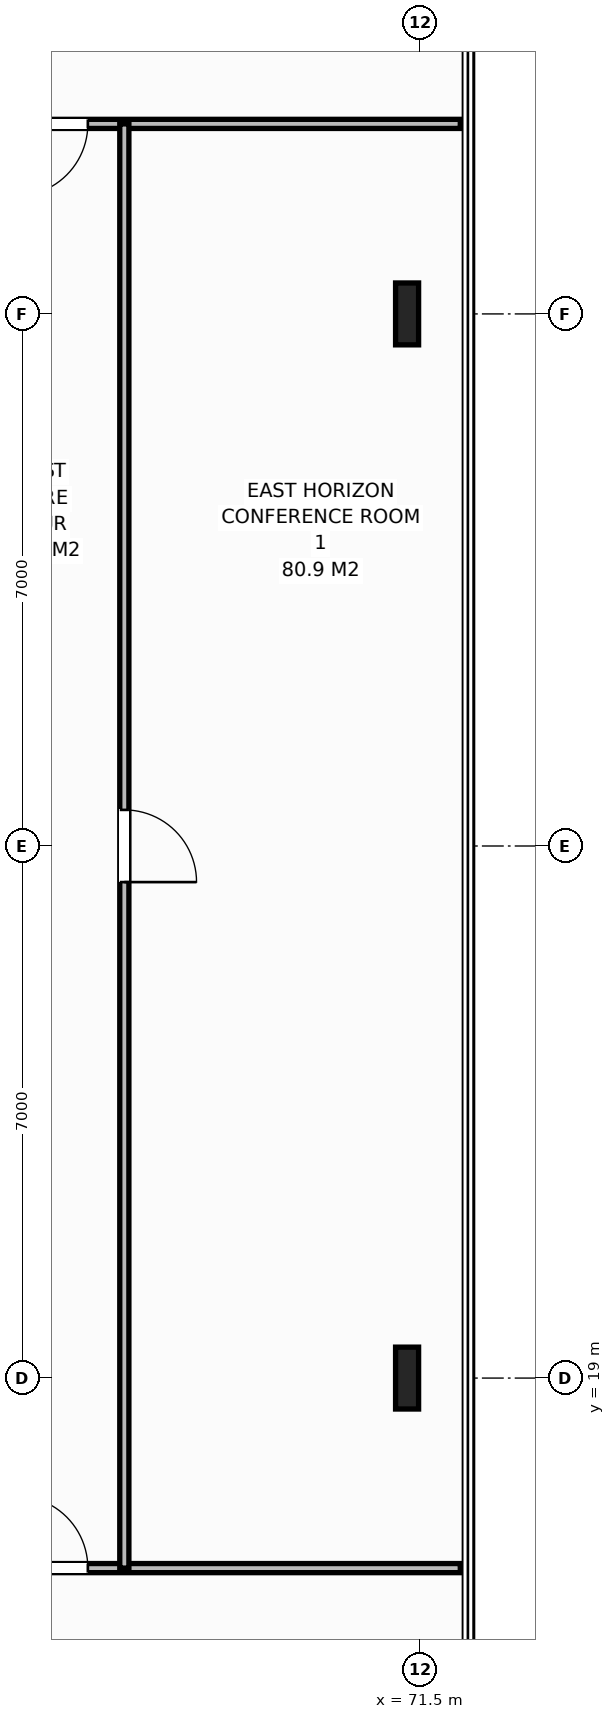
"""IFC4 building model, lengths in metres.
Left out: names, types, materials, properties, quantities, classifications, styles, units other than length and angle.
Written with IfcOpenShell. Run it as: python <this file> out.ifc"""

import sys

from ifc_helpers import new_model, si_unit, direction, frame, frame_2d, origin, origin_2d, place, context, subcontext, project, spatial, rectangle, i_section, extrude, element, fill, save


model = new_model("IFC4")
c1 = context("Model", 3, precision=1e-05, world=origin(), true_north=direction((0.0, 1.0)))
c2 = subcontext(c1, "Body", "Model", "MODEL_VIEW")
j1 = project(units=[si_unit("LENGTHUNIT", "METRE"), si_unit("PLANEANGLEUNIT", "RADIAN")], contexts=[c1])
p1 = place(None, origin())
s1 = spatial("IfcSite", under=j1, at=p1, CompositionType="ELEMENT")
p2 = place(p1, origin())
s2 = spatial("IfcBuilding", under=s1, at=p2, CompositionType="ELEMENT")
p3 = place(p2, frame((0.0, 0.0, 251.8)))
s3 = spatial("IfcBuildingStorey", under=s2, at=p3, CompositionType="ELEMENT", Elevation=251.8)
for number, where, z_axis, x_axis in (
    (1, (71.32, 19.0, 0.0), (0.0, 0.0, 1.0), (1.0, 0.0, 0.0)),
    (2, (71.32, 33.0, 0.0), (0.0, 0.0, 1.0), (1.0, 0.0, 0.0)),
):
    element("IfcColumn", number, at=place(p3, frame(where, z_axis=z_axis, x_axis=x_axis)), inside=s3, PredefinedType="COLUMN", context=c2, shape_type="SweptSolid", body=[
        extrude(i_section(OverallWidth=0.303, OverallDepth=0.814, WebThickness=0.021, FlangeThickness=0.04, at=origin_2d()), origin(), (0.0, 0.0, 1.0), 3.8),
    ])
p4 = place(p3, frame((64.86, 35.5, 0.0), z_axis=(0.0, 0.0, 1.0), x_axis=(1.0, 0.0, 0.0)))
e3 = element("IfcWall", 3, at=p4, inside=s3, PredefinedType="PARTITIONING", context=c2, shape_type="SweptSolid", body=[
    extrude(rectangle(XDim=7.16, YDim=0.12, at=frame_2d((3.58, 0.0))), origin(), (0.0, 0.0, 1.0), 3.588),
])
p5 = place(p4, frame((1.31, 0.0, 0.0)))
e4 = element("IfcOpeningElement", 4, at=p5, cuts=e3, PredefinedType="OPENING", context=c2, shape_type="SweptSolid", body=[
    extrude(rectangle(XDim=0.95, YDim=2.15, at=frame_2d((0.475, 1.075))), frame((0.0, 0.07, 0.0), z_axis=(0.0, -1.0, 0.0), x_axis=(1.0, 0.0, 0.0)), (0.0, 0.0, 1.0), 0.14),
])
p6 = place(p3, frame((64.063, 16.5, 0.0), z_axis=(0.0, 0.0, 1.0), x_axis=(1.0, 0.0, 0.0)))
e5 = element("IfcWall", 5, at=p6, inside=s3, PredefinedType="PARTITIONING", context=c2, shape_type="SweptSolid", body=[
    extrude(rectangle(XDim=7.957, YDim=0.12, at=frame_2d((3.979, 0.0))), origin(), (0.0, 0.0, 1.0), 3.588),
])
p7 = place(p6, frame((2.107, 0.0, 0.0)))
e6 = element("IfcOpeningElement", 6, at=p7, cuts=e5, PredefinedType="OPENING", context=c2, shape_type="SweptSolid", body=[
    extrude(rectangle(XDim=0.95, YDim=2.15, at=frame_2d((0.475, 1.075))), frame((0.0, 0.07, 0.0), z_axis=(0.0, -1.0, 0.0), x_axis=(1.0, 0.0, 0.0)), (0.0, 0.0, 1.0), 0.14),
])
p8 = place(p3, frame((67.6, 16.5, 0.0), z_axis=(0.0, 0.0, 1.0), x_axis=(0.0, 1.0, 0.0)))
e7 = element("IfcWall", 7, at=p8, inside=s3, PredefinedType="PARTITIONING", context=c2, shape_type="SweptSolid", body=[
    extrude(rectangle(XDim=19.0, YDim=0.12, at=frame_2d((9.5, 0.0))), origin(), (0.0, 0.0, 1.0), 3.588),
])
p9 = place(p8, frame((9.025, 0.0, 0.0)))
e8 = element("IfcOpeningElement", 8, at=p9, cuts=e7, PredefinedType="OPENING", context=c2, shape_type="SweptSolid", body=[
    extrude(rectangle(XDim=0.95, YDim=2.15, at=frame_2d((0.475, 1.075))), frame((0.0, 0.07, 0.0), z_axis=(0.0, -1.0, 0.0), x_axis=(1.0, 0.0, 0.0)), (0.0, 0.0, 1.0), 0.14),
])
p10 = place(p5, origin())
e9 = element("IfcDoor", 9, at=p10, inside=s3, OperationType="SINGLE_SWING_RIGHT", PredefinedType="DOOR", context=c2, shape_type="SweptSolid", body=[
    extrude(rectangle(XDim=0.95, YDim=2.15, at=frame_2d((0.475, 1.075))), frame((0.0, 0.025, 0.0), z_axis=(0.0, -1.0, 0.0), x_axis=(1.0, 0.0, 0.0)), (0.0, 0.0, 1.0), 0.05),
])
fill(e4, e9)
p11 = place(p7, origin())
e10 = element("IfcDoor", 10, at=p11, inside=s3, OperationType="SINGLE_SWING_LEFT", PredefinedType="DOOR", context=c2, shape_type="SweptSolid", body=[
    extrude(rectangle(XDim=0.95, YDim=2.15, at=frame_2d((0.475, 1.075))), frame((0.0, 0.025, 0.0), z_axis=(0.0, -1.0, 0.0), x_axis=(1.0, 0.0, 0.0)), (0.0, 0.0, 1.0), 0.05),
])
fill(e6, e10)
p12 = place(p9, origin())
e11 = element("IfcDoor", 11, at=p12, inside=s3, OperationType="SINGLE_SWING_RIGHT", PredefinedType="DOOR", context=c2, shape_type="SweptSolid", body=[
    extrude(rectangle(XDim=0.95, YDim=2.15, at=frame_2d((0.475, 1.075))), frame((0.0, 0.025, 0.0), z_axis=(0.0, -1.0, 0.0), x_axis=(1.0, 0.0, 0.0)), (0.0, 0.0, 1.0), 0.05),
])
fill(e8, e11)
save(model, sys.argv[1])
